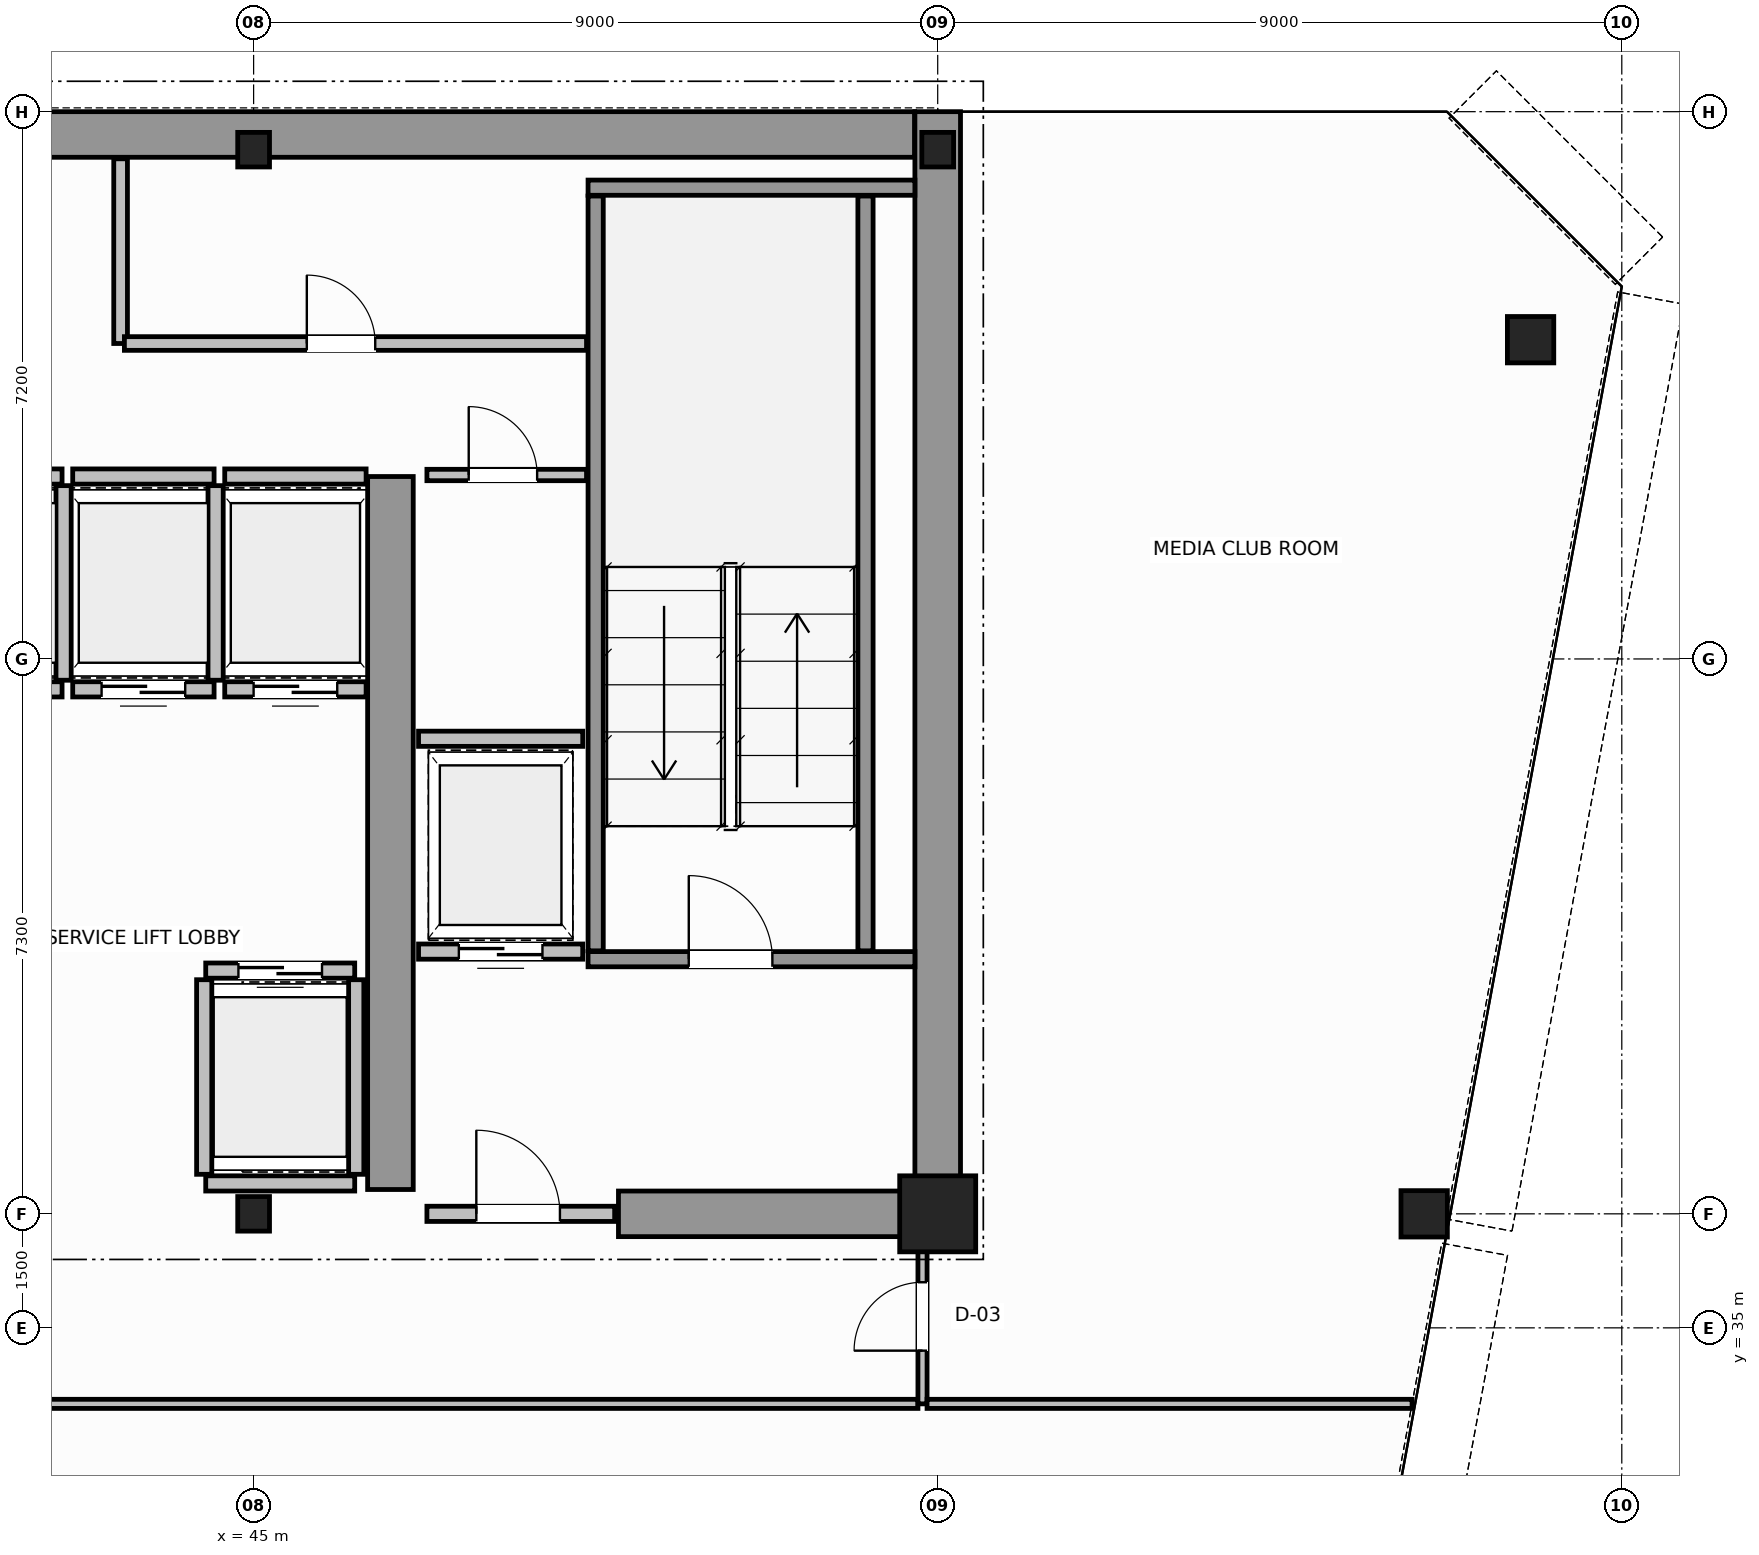
"""IFC4 building model, lengths in metres.
Left out: names, types, materials, properties, quantities, classifications, styles, units other than length and angle.
Written with IfcOpenShell. Run it as: python <this file> out.ifc"""

import sys

from ifc_helpers import new_model, si_unit, direction, frame, frame_2d, origin, origin_2d, place, context, subcontext, project, spatial, rectangle, hollow_circle, i_section, extrude, source, transform, mapped, element, fill, save


model = new_model("IFC4")
c1 = context("Model", 3, precision=1e-05, world=origin(), true_north=direction((0.0, 1.0)))
c2 = subcontext(c1, "Body", "Model", "MODEL_VIEW")
j1 = project(units=[si_unit("LENGTHUNIT", "METRE"), si_unit("PLANEANGLEUNIT", "RADIAN")], contexts=[c1])
p1 = place(None, origin())
s1 = spatial("IfcSite", under=j1, at=p1, CompositionType="ELEMENT")
p2 = place(p1, origin())
s2 = spatial("IfcBuilding", under=s1, at=p2, CompositionType="ELEMENT")
p3 = place(p2, frame((0.0, 0.0, 230.8)))
s3 = spatial("IfcBuildingStorey", under=s2, at=p3, CompositionType="ELEMENT", Elevation=230.8)
m1 = source(origin(), c2, "Body", "SweptSolid", [
    extrude(i_section(OverallWidth=0.418, OverallDepth=0.455, WebThickness=0.042, FlangeThickness=0.058, FilletRadius=0.015, at=origin_2d()), origin(), (0.0, 0.0, 1.0), 3.8),
])
p4 = place(p3, frame((45.0, 36.5, 0.0), z_axis=(0.0, 0.0, 1.0), x_axis=(1.0, 0.0, 0.0)))
e1 = element("IfcColumn", 1, at=p4, inside=s3, PredefinedType="COLUMN", context=c2, shape_type="MappedRepresentation", body=[
    mapped(m1, transform((0.0, 0.0, 0.0), scale=1.0)),
])
m2 = source(origin(), c2, "Body", "SweptSolid", [
    extrude(rectangle(XDim=1.0, YDim=1.0, at=origin_2d()), origin(), (0.0, 0.0, 1.0), 3.8),
])
p5 = place(p3, frame((54.0, 36.5, 0.0), z_axis=(0.0, 0.0, 1.0), x_axis=(1.0, 0.0, 0.0)))
e2 = element("IfcColumn", 2, at=p5, inside=s3, PredefinedType="COLUMN", context=c2, shape_type="MappedRepresentation", body=[
    mapped(m2, transform((0.0, 0.0, 0.0), scale=1.0)),
])
for number, where, z_axis, x_axis in (
    (3, (45.0, 50.5, 0.0), (0.0, 0.0, 1.0), (1.0, 0.0, 0.0)),
    (4, (54.0, 50.5, 0.0), (0.0, 0.0, 1.0), (1.0, 0.0, 0.0)),
):
    element("IfcColumn", number, at=place(p3, frame(where, z_axis=z_axis, x_axis=x_axis)), inside=s3, PredefinedType="COLUMN", context=c2, shape_type="MappedRepresentation", body=[
        mapped(m1, transform((0.0, 0.0, 0.0), scale=1.0)),
    ])
m3 = source(origin(), c2, "Body", "SweptSolid", [
    extrude(hollow_circle(Radius=0.305, WallThickness=0.03, at=origin_2d()), origin(), (0.0, 0.0, 1.0), 3.8),
])
for number, where, z_axis, x_axis in (
    (5, (61.8, 48.0, 0.0), (0.0, 0.0, 1.0), (1.0, 0.0, 0.0)),
    (6, (60.4, 36.5, 0.0), (0.0, 0.0, 1.0), (1.0, 0.0, 0.0)),
):
    element("IfcColumn", number, at=place(p3, frame(where, z_axis=z_axis, x_axis=x_axis)), inside=s3, PredefinedType="COLUMN", context=c2, shape_type="MappedRepresentation", body=[
        mapped(m3, transform((0.0, 0.0, 0.0), scale=1.0)),
    ])
p6 = place(p3, frame((34.002, 50.7, 0.0), z_axis=(0.0, 0.0, 1.0), x_axis=(1.0, 0.0, 0.0)))
e7 = element("IfcWall", 7, at=p6, inside=s3, PredefinedType="SHEAR", context=c2, shape_type="SweptSolid", body=[
    extrude(rectangle(XDim=19.694, YDim=0.6, at=frame_2d((9.847, 0.0))), origin(), (0.0, 0.0, 1.0), 3.8),
])
p7 = place(p3, frame((54.0, 36.5, 0.0), z_axis=(0.0, 0.0, 1.0), x_axis=(0.0, 1.0, 0.0)))
e8 = element("IfcWall", 8, at=p7, inside=s3, PredefinedType="SHEAR", context=c2, shape_type="SweptSolid", body=[
    extrude(rectangle(XDim=14.5, YDim=0.6, at=frame_2d((7.25, 0.0))), origin(), (0.0, 0.0, 1.0), 3.8),
])
p8 = place(p3, frame((49.8, 36.5, 0.0), z_axis=(0.0, 0.0, 1.0), x_axis=(1.0, 0.0, 0.0)))
e9 = element("IfcWall", 9, at=p8, inside=s3, PredefinedType="SHEAR", context=c2, shape_type="SweptSolid", body=[
    extrude(rectangle(XDim=3.88, YDim=0.6, at=frame_2d((1.94, 0.0))), origin(), (0.0, 0.0, 1.0), 2.58),
])
p9 = place(p3, frame((46.8, 36.82, 0.0), z_axis=(0.0, 0.0, 1.0), x_axis=(0.0, 1.0, 0.0)))
e10 = element("IfcWall", 10, at=p9, inside=s3, PredefinedType="SHEAR", context=c2, shape_type="SweptSolid", body=[
    extrude(rectangle(XDim=9.38, YDim=0.6, at=frame_2d((4.69, 0.0))), origin(), (0.0, 0.0, 1.0), 3.8),
])
p10 = place(p3, frame((49.4, 39.85, 0.0), z_axis=(0.0, 0.0, 1.0), x_axis=(1.0, 0.0, 0.0)))
e11 = element("IfcWall", 11, at=p10, inside=s3, PredefinedType="SOLIDWALL", context=c2, shape_type="SweptSolid", body=[
    extrude(rectangle(XDim=4.3, YDim=0.2, at=frame_2d((2.15, 0.0))), origin(), (0.0, 0.0, 1.0), 3.8),
])
p11 = place(p10, frame((1.325, 0.0, 0.0)))
e12 = element("IfcOpeningElement", 12, at=p11, cuts=e11, PredefinedType="OPENING", context=c2, shape_type="SweptSolid", body=[
    extrude(rectangle(XDim=1.1, YDim=2.15, at=frame_2d((0.55, 1.075))), frame((0.0, 0.11, 0.0), z_axis=(0.0, -1.0, 0.0), x_axis=(1.0, 0.0, 0.0)), (0.0, 0.0, 1.0), 0.22),
])
p12 = place(p3, frame((49.4, 50.0, 0.0), z_axis=(0.0, 0.0, 1.0), x_axis=(1.0, 0.0, 0.0)))
e13 = element("IfcWall", 13, at=p12, inside=s3, PredefinedType="SOLIDWALL", context=c2, shape_type="SweptSolid", body=[
    extrude(rectangle(XDim=4.3, YDim=0.2, at=frame_2d((2.15, 0.0))), origin(), (0.0, 0.0, 1.0), 3.8),
])
for number, where, z_axis, x_axis in (
    (14, (49.5, 39.96, 0.0), (0.0, 0.0, 1.0), (0.0, 1.0, 0.0)),
    (15, (53.05, 39.96, 0.0), (0.0, 0.0, 1.0), (0.0, 1.0, 0.0)),
):
    element("IfcWall", number, at=place(p3, frame(where, z_axis=z_axis, x_axis=x_axis)), inside=s3, PredefinedType="SOLIDWALL", context=c2, shape_type="SweptSolid", body=[
        extrude(rectangle(XDim=9.93, YDim=0.2, at=frame_2d((4.965, 0.0))), origin(), (0.0, 0.0, 1.0), 3.8),
    ])
p13 = place(p3, frame((47.28, 36.5, 0.0), z_axis=(0.0, 0.0, 1.0), x_axis=(1.0, 0.0, 0.0)))
e16 = element("IfcWall", 16, at=p13, inside=s3, PredefinedType="SOLIDWALL", context=c2, shape_type="SweptSolid", body=[
    extrude(rectangle(XDim=2.47, YDim=0.2, at=frame_2d((1.235, 0.0))), origin(), (0.0, 0.0, 1.0), 2.57),
])
p14 = place(p13, frame((0.65, 0.0, 0.0)))
e17 = element("IfcOpeningElement", 17, at=p14, cuts=e16, PredefinedType="OPENING", context=c2, shape_type="SweptSolid", body=[
    extrude(rectangle(XDim=1.1, YDim=2.15, at=frame_2d((0.55, 1.075))), frame((0.0, 0.11, 0.0), z_axis=(0.0, -1.0, 0.0), x_axis=(1.0, 0.0, 0.0)), (0.0, 0.0, 1.0), 0.22),
])
p15 = place(p3, frame((44.37, 39.7, 0.0), z_axis=(0.0, 0.0, 1.0), x_axis=(1.0, 0.0, 0.0)))
e18 = element("IfcWall", 18, at=p15, inside=s3, PredefinedType="SOLIDWALL", context=c2, shape_type="SweptSolid", body=[
    extrude(rectangle(XDim=1.96, YDim=0.2, at=frame_2d((0.98, 0.0))), origin(), (0.0, 0.0, 1.0), 3.58),
])
p16 = place(p15, frame((0.43, 0.0, 0.0)))
e19 = element("IfcOpeningElement", 19, at=p16, cuts=e18, PredefinedType="OPENING", context=c2, shape_type="SweptSolid", body=[
    extrude(rectangle(XDim=1.1, YDim=2.15, at=frame_2d((0.55, 1.075))), frame((0.0, 0.11, 0.0), z_axis=(0.0, -1.0, 0.0), x_axis=(1.0, 0.0, 0.0)), (0.0, 0.0, 1.0), 0.22),
])
p17 = place(p3, frame((44.37, 36.9, 0.0), z_axis=(0.0, 0.0, 1.0), x_axis=(1.0, 0.0, 0.0)))
e20 = element("IfcWall", 20, at=p17, inside=s3, PredefinedType="SOLIDWALL", context=c2, shape_type="SweptSolid", body=[
    extrude(rectangle(XDim=1.96, YDim=0.2, at=frame_2d((0.98, 0.0))), origin(), (0.0, 0.0, 1.0), 2.57),
])
for number, where, z_axis, x_axis in (
    (21, (44.35, 37.02, 0.0), (0.0, 0.0, 1.0), (0.0, 1.0, 0.0)),
    (22, (46.35, 37.02, 0.0), (0.0, 0.0, 1.0), (0.0, 1.0, 0.0)),
):
    element("IfcWall", number, at=place(p3, frame(where, z_axis=z_axis, x_axis=x_axis)), inside=s3, PredefinedType="SOLIDWALL", context=c2, shape_type="SweptSolid", body=[
        extrude(rectangle(XDim=2.56, YDim=0.2, at=frame_2d((1.28, 0.0))), origin(), (0.0, 0.0, 1.0), 3.58),
    ])
p18 = place(p3, frame((40.62, 43.4, 0.0), z_axis=(0.0, 0.0, 1.0), x_axis=(1.0, 0.0, 0.0)))
e23 = element("IfcWall", 23, at=p18, inside=s3, PredefinedType="SOLIDWALL", context=c2, shape_type="SweptSolid", body=[
    extrude(rectangle(XDim=1.86, YDim=0.2, at=frame_2d((0.93, 0.0))), origin(), (0.0, 0.0, 1.0), 3.58),
])
p19 = place(p18, frame((0.38, 0.0, 0.0)))
e24 = element("IfcOpeningElement", 24, at=p19, cuts=e23, PredefinedType="OPENING", context=c2, shape_type="SweptSolid", body=[
    extrude(rectangle(XDim=1.1, YDim=2.15, at=frame_2d((0.55, 1.075))), frame((0.0, 0.11, 0.0), z_axis=(0.0, -1.0, 0.0), x_axis=(1.0, 0.0, 0.0)), (0.0, 0.0, 1.0), 0.22),
])
p20 = place(p3, frame((40.62, 46.2, 0.0), z_axis=(0.0, 0.0, 1.0), x_axis=(1.0, 0.0, 0.0)))
e25 = element("IfcWall", 25, at=p20, inside=s3, PredefinedType="SOLIDWALL", context=c2, shape_type="SweptSolid", body=[
    extrude(rectangle(XDim=1.86, YDim=0.2, at=frame_2d((0.93, 0.0))), origin(), (0.0, 0.0, 1.0), 3.58),
])
p21 = place(p3, frame((42.5, 43.52, 0.0), z_axis=(0.0, 0.0, 1.0), x_axis=(0.0, 1.0, 0.0)))
e26 = element("IfcWall", 26, at=p21, inside=s3, PredefinedType="SOLIDWALL", context=c2, shape_type="SweptSolid", body=[
    extrude(rectangle(XDim=2.56, YDim=0.2, at=frame_2d((1.28, 0.0))), origin(), (0.0, 0.0, 1.0), 3.58),
])
p22 = place(p3, frame((42.62, 43.4, 0.0), z_axis=(0.0, 0.0, 1.0), x_axis=(1.0, 0.0, 0.0)))
e27 = element("IfcWall", 27, at=p22, inside=s3, PredefinedType="SOLIDWALL", context=c2, shape_type="SweptSolid", body=[
    extrude(rectangle(XDim=1.86, YDim=0.2, at=frame_2d((0.93, 0.0))), origin(), (0.0, 0.0, 1.0), 3.58),
])
p23 = place(p22, frame((0.38, 0.0, 0.0)))
e28 = element("IfcOpeningElement", 28, at=p23, cuts=e27, PredefinedType="OPENING", context=c2, shape_type="SweptSolid", body=[
    extrude(rectangle(XDim=1.1, YDim=2.15, at=frame_2d((0.55, 1.075))), frame((0.0, 0.11, 0.0), z_axis=(0.0, -1.0, 0.0), x_axis=(1.0, 0.0, 0.0)), (0.0, 0.0, 1.0), 0.22),
])
p24 = place(p3, frame((42.62, 46.2, 0.0), z_axis=(0.0, 0.0, 1.0), x_axis=(1.0, 0.0, 0.0)))
e29 = element("IfcWall", 29, at=p24, inside=s3, PredefinedType="SOLIDWALL", context=c2, shape_type="SweptSolid", body=[
    extrude(rectangle(XDim=1.86, YDim=0.2, at=frame_2d((0.93, 0.0))), origin(), (0.0, 0.0, 1.0), 3.58),
])
p25 = place(p3, frame((44.5, 43.52, 0.0), z_axis=(0.0, 0.0, 1.0), x_axis=(0.0, 1.0, 0.0)))
e30 = element("IfcWall", 30, at=p25, inside=s3, PredefinedType="SOLIDWALL", context=c2, shape_type="SweptSolid", body=[
    extrude(rectangle(XDim=2.56, YDim=0.2, at=frame_2d((1.28, 0.0))), origin(), (0.0, 0.0, 1.0), 3.58),
])
p26 = place(p3, frame((44.62, 43.4, 0.0), z_axis=(0.0, 0.0, 1.0), x_axis=(1.0, 0.0, 0.0)))
e31 = element("IfcWall", 31, at=p26, inside=s3, PredefinedType="SOLIDWALL", context=c2, shape_type="SweptSolid", body=[
    extrude(rectangle(XDim=1.86, YDim=0.2, at=frame_2d((0.93, 0.0))), origin(), (0.0, 0.0, 1.0), 3.58),
])
p27 = place(p26, frame((0.38, 0.0, 0.0)))
e32 = element("IfcOpeningElement", 32, at=p27, cuts=e31, PredefinedType="OPENING", context=c2, shape_type="SweptSolid", body=[
    extrude(rectangle(XDim=1.1, YDim=2.15, at=frame_2d((0.55, 1.075))), frame((0.0, 0.11, 0.0), z_axis=(0.0, -1.0, 0.0), x_axis=(1.0, 0.0, 0.0)), (0.0, 0.0, 1.0), 0.22),
])
p28 = place(p3, frame((44.62, 46.2, 0.0), z_axis=(0.0, 0.0, 1.0), x_axis=(1.0, 0.0, 0.0)))
e33 = element("IfcWall", 33, at=p28, inside=s3, PredefinedType="SOLIDWALL", context=c2, shape_type="SweptSolid", body=[
    extrude(rectangle(XDim=1.86, YDim=0.2, at=frame_2d((0.93, 0.0))), origin(), (0.0, 0.0, 1.0), 3.58),
])
p29 = place(p3, frame((47.17, 39.95, 0.0), z_axis=(0.0, 0.0, 1.0), x_axis=(1.0, 0.0, 0.0)))
e34 = element("IfcWall", 34, at=p29, inside=s3, PredefinedType="SOLIDWALL", context=c2, shape_type="SweptSolid", body=[
    extrude(rectangle(XDim=2.16, YDim=0.2, at=frame_2d((1.08, 0.0))), origin(), (0.0, 0.0, 1.0), 3.58),
])
p30 = place(p29, frame((0.53, 0.0, 0.0)))
e35 = element("IfcOpeningElement", 35, at=p30, cuts=e34, PredefinedType="OPENING", context=c2, shape_type="SweptSolid", body=[
    extrude(rectangle(XDim=1.1, YDim=2.15, at=frame_2d((0.55, 1.075))), frame((0.0, 0.11, 0.0), z_axis=(0.0, -1.0, 0.0), x_axis=(1.0, 0.0, 0.0)), (0.0, 0.0, 1.0), 0.22),
])
p31 = place(p3, frame((47.17, 42.75, 0.0), z_axis=(0.0, 0.0, 1.0), x_axis=(1.0, 0.0, 0.0)))
e36 = element("IfcWall", 36, at=p31, inside=s3, PredefinedType="SOLIDWALL", context=c2, shape_type="SweptSolid", body=[
    extrude(rectangle(XDim=2.16, YDim=0.2, at=frame_2d((1.08, 0.0))), origin(), (0.0, 0.0, 1.0), 3.58),
])
p32 = place(p3, frame((47.28, 46.22, 0.0), z_axis=(0.0, 0.0, 1.0), x_axis=(1.0, 0.0, 0.0)))
e37 = element("IfcWall", 37, at=p32, inside=s3, PredefinedType="PARTITIONING", context=c2, shape_type="SweptSolid", body=[
    extrude(rectangle(XDim=2.1, YDim=0.15, at=frame_2d((1.05, 0.0))), origin(), (0.0, 0.0, 1.0), 3.58),
])
p33 = place(p32, frame((0.55, 0.0, 0.0)))
e38 = element("IfcOpeningElement", 38, at=p33, cuts=e37, PredefinedType="OPENING", context=c2, shape_type="SweptSolid", body=[
    extrude(rectangle(XDim=0.9, YDim=2.1, at=frame_2d((0.45, 1.05))), frame((0.0, 0.085, 0.0), z_axis=(0.0, -1.0, 0.0), x_axis=(1.0, 0.0, 0.0)), (0.0, 0.0, 1.0), 0.17),
])
p34 = place(p3, frame((43.25, 47.95, 0.0), z_axis=(0.0, 0.0, 1.0), x_axis=(0.0, 1.0, 0.0)))
e39 = element("IfcWall", 39, at=p34, inside=s3, PredefinedType="PLUMBINGWALL", context=c2, shape_type="SweptSolid", body=[
    extrude(rectangle(XDim=2.43, YDim=0.18, at=frame_2d((1.215, 0.0))), origin(), (0.0, 0.0, 1.0), 3.58),
])
p35 = place(p3, frame((43.3, 47.95, 0.0), z_axis=(0.0, 0.0, 1.0), x_axis=(1.0, 0.0, 0.0)))
e40 = element("IfcWall", 40, at=p35, inside=s3, PredefinedType="PLUMBINGWALL", context=c2, shape_type="SweptSolid", body=[
    extrude(rectangle(XDim=6.08, YDim=0.18, at=frame_2d((3.04, 0.0))), origin(), (0.0, 0.0, 1.0), 3.58),
])
p36 = place(p35, frame((2.4, 0.0, 0.0)))
e41 = element("IfcOpeningElement", 41, at=p36, cuts=e40, PredefinedType="OPENING", context=c2, shape_type="SweptSolid", body=[
    extrude(rectangle(XDim=0.9, YDim=2.15, at=frame_2d((0.45, 1.075))), frame((0.0, 0.1, 0.0), z_axis=(0.0, -1.0, 0.0), x_axis=(1.0, 0.0, 0.0)), (0.0, 0.0, 1.0), 0.2),
])
p37 = place(p3, frame((37.06, 34.0, 0.0), z_axis=(0.0, 0.0, 1.0), x_axis=(1.0, 0.0, 0.0)))
e42 = element("IfcWall", 42, at=p37, inside=s3, PredefinedType="PARTITIONING", context=c2, shape_type="SweptSolid", body=[
    extrude(rectangle(XDim=16.68, YDim=0.12, at=frame_2d((8.34, 0.0))), origin(), (0.0, 0.0, 1.0), 3.58),
])
p38 = place(p3, frame((53.8, 34.0, 0.0), z_axis=(0.0, 0.0, 1.0), x_axis=(0.0, 1.0, 0.0)))
e43 = element("IfcWall", 43, at=p38, inside=s3, PredefinedType="PARTITIONING", context=c2, shape_type="SweptSolid", body=[
    extrude(rectangle(XDim=2.44, YDim=0.12, at=frame_2d((1.22, 0.0))), origin(), (0.0, 0.0, 1.0), 3.58),
])
p39 = place(p38, frame((0.7, 0.0, 0.0)))
e44 = element("IfcOpeningElement", 44, at=p39, cuts=e43, PredefinedType="OPENING", context=c2, shape_type="SweptSolid", body=[
    extrude(rectangle(XDim=0.9, YDim=2.15, at=frame_2d((0.45, 1.075))), frame((0.0, 0.07, 0.0), z_axis=(0.0, -1.0, 0.0), x_axis=(1.0, 0.0, 0.0)), (0.0, 0.0, 1.0), 0.14),
])
p40 = place(p3, frame((53.86, 34.0, 0.0), z_axis=(0.0, 0.0, 1.0), x_axis=(1.0, 0.0, 0.0)))
e45 = element("IfcWall", 45, at=p40, inside=s3, PredefinedType="PARTITIONING", context=c2, shape_type="SweptSolid", body=[
    extrude(rectangle(XDim=6.381, YDim=0.12, at=frame_2d((3.19, 0.0))), origin(), (0.0, 0.0, 1.0), 3.58),
])
m4 = source(origin(), c2, "Body", "SweptSolid", [
    extrude(rectangle(XDim=1.1, YDim=2.15, at=frame_2d((0.55, 1.075))), frame((0.0, 0.025, 0.0), z_axis=(0.0, -1.0, 0.0), x_axis=(1.0, 0.0, 0.0)), (0.0, 0.0, 1.0), 0.05),
])
p41 = place(p11, origin())
e46 = element("IfcDoor", 46, at=p41, inside=s3, OperationType="SINGLE_SWING_RIGHT", PredefinedType="DOOR", context=c2, shape_type="MappedRepresentation", body=[
    mapped(m4, transform((0.0, 0.0, 0.0), scale=1.0)),
])
fill(e12, e46)
p42 = place(p14, origin())
e47 = element("IfcDoor", 47, at=p42, inside=s3, OperationType="SINGLE_SWING_LEFT", PredefinedType="DOOR", context=c2, shape_type="MappedRepresentation", body=[
    mapped(m4, transform((0.0, 0.0, 0.0), scale=1.0)),
])
fill(e17, e47)
p43 = place(p16, origin())
e48 = element("IfcDoor", 48, at=p43, inside=s3, OperationType="DOUBLE_DOOR_SLIDING", PredefinedType="DOOR", context=c2, shape_type="MappedRepresentation", body=[
    mapped(m4, transform((0.0, 0.0, 0.0), scale=1.0)),
])
fill(e19, e48)
p44 = place(p23, origin())
e49 = element("IfcDoor", 49, at=p44, inside=s3, OperationType="DOUBLE_DOOR_SLIDING", PredefinedType="DOOR", context=c2, shape_type="MappedRepresentation", body=[
    mapped(m4, transform((0.0, 0.0, 0.0), scale=1.0)),
])
fill(e28, e49)
p45 = place(p27, origin())
e50 = element("IfcDoor", 50, at=p45, inside=s3, OperationType="DOUBLE_DOOR_SLIDING", PredefinedType="DOOR", context=c2, shape_type="MappedRepresentation", body=[
    mapped(m4, transform((0.0, 0.0, 0.0), scale=1.0)),
])
fill(e32, e50)
p46 = place(p30, origin())
e51 = element("IfcDoor", 51, at=p46, inside=s3, OperationType="DOUBLE_DOOR_SLIDING", PredefinedType="DOOR", context=c2, shape_type="MappedRepresentation", body=[
    mapped(m4, transform((0.0, 0.0, 0.0), scale=1.0)),
])
fill(e35, e51)
m5 = source(origin(), c2, "Body", "SweptSolid", [
    extrude(rectangle(XDim=0.9, YDim=2.1, at=frame_2d((0.45, 1.05))), frame((0.0, 0.025, 0.0), z_axis=(0.0, -1.0, 0.0), x_axis=(1.0, 0.0, 0.0)), (0.0, 0.0, 1.0), 0.05),
])
p47 = place(p33, origin())
e52 = element("IfcDoor", 52, at=p47, inside=s3, OperationType="SINGLE_SWING_RIGHT", PredefinedType="DOOR", context=c2, shape_type="MappedRepresentation", body=[
    mapped(m5, transform((0.0, 0.0, 0.0), scale=1.0)),
])
fill(e38, e52)
m6 = source(origin(), c2, "Body", "SweptSolid", [
    extrude(rectangle(XDim=0.9, YDim=2.15, at=frame_2d((0.45, 1.075))), frame((0.0, 0.025, 0.0), z_axis=(0.0, -1.0, 0.0), x_axis=(1.0, 0.0, 0.0)), (0.0, 0.0, 1.0), 0.05),
])
p48 = place(p36, origin())
e53 = element("IfcDoor", 53, at=p48, inside=s3, OperationType="SINGLE_SWING_RIGHT", PredefinedType="DOOR", context=c2, shape_type="MappedRepresentation", body=[
    mapped(m6, transform((0.0, 0.0, 0.0), scale=1.0)),
])
fill(e41, e53)
p49 = place(p39, origin())
e54 = element("IfcDoor", 54, at=p49, inside=s3, OperationType="SINGLE_SWING_RIGHT", PredefinedType="DOOR", context=c2, shape_type="MappedRepresentation", body=[
    mapped(m6, transform((0.0, 0.0, 0.0), scale=1.0)),
])
fill(e44, e54)
save(model, sys.argv[1])
